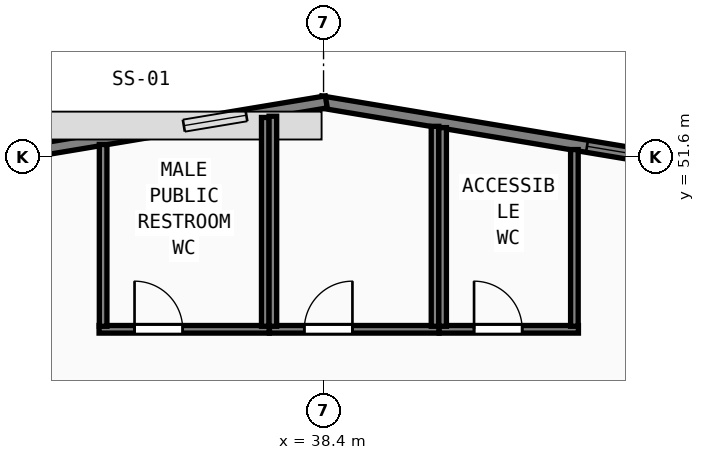
"""IFC4 building model, lengths in metres.
Left out: names, types, materials, properties, quantities, classifications, styles, units other than length and angle.
Written with IfcOpenShell. Run it as: python <this file> out.ifc"""

import sys

from ifc_helpers import new_model, si_unit, direction, frame, frame_2d, origin, origin_2d, place, context, subcontext, project, spatial, rectangle, hollow_rectangle, extrude, element, fill, save


model = new_model("IFC4")
c1 = context("Model", 3, precision=1e-05, world=origin(), true_north=direction((0.0, 1.0)))
c2 = subcontext(c1, "Body", "Model", "MODEL_VIEW")
j1 = project(units=[si_unit("LENGTHUNIT", "METRE"), si_unit("PLANEANGLEUNIT", "RADIAN")], contexts=[c1])
p1 = place(None, origin())
s1 = spatial("IfcSite", under=j1, at=p1, CompositionType="ELEMENT")
p2 = place(p1, origin())
s2 = spatial("IfcBuilding", under=s1, at=p2, CompositionType="ELEMENT")
p3 = place(p2, frame((0.0, 0.0, 164.6)))
s3 = spatial("IfcBuildingStorey", under=s2, at=p3, CompositionType="ELEMENT", Elevation=164.6)
p4 = place(p3, frame((38.4, 50.4, 0.0), z_axis=(0.0, 0.0, 1.0), x_axis=(1.0, 0.0, 0.0)))
e1 = element("IfcColumn", 1, at=p4, inside=s3, PredefinedType="COLUMN", context=c2, shape_type="SweptSolid", body=[
    extrude(hollow_rectangle(XDim=0.8, YDim=0.8, WallThickness=0.03, at=origin_2d()), origin(), (0.0, 0.0, 1.0), 4.4),
])
p5 = place(p3, frame((45.606, 51.477, 0.0), z_axis=(0.0, 0.0, 1.0), x_axis=(-0.986394820321, 0.164393608283, 0.0)))
e2 = element("IfcWall", 2, at=p5, inside=s3, PredefinedType="SOLIDWALL", context=c2, shape_type="SweptSolid", body=[
    extrude(rectangle(XDim=7.36, YDim=0.24, at=frame_2d((3.68, 0.0))), origin(), (0.0, 0.0, 1.0), 4.22),
])
p6 = place(p5, frame((0.784, 0.0, 0.85)))
e3 = element("IfcOpeningElement", 3, at=p6, cuts=e2, PredefinedType="OPENING", context=c2, shape_type="SweptSolid", body=[
    extrude(rectangle(XDim=1.25, YDim=1.95, at=frame_2d((0.625, 0.975))), frame((0.0, 0.13, 0.0), z_axis=(0.0, -1.0, 0.0), x_axis=(1.0, 0.0, 0.0)), (0.0, 0.0, 1.0), 0.26),
])
p7 = place(p3, frame((38.454, 52.687, 0.0), z_axis=(0.0, 0.0, 1.0), x_axis=(-0.986394820321, -0.164393608283, 0.0)))
e4 = element("IfcWall", 4, at=p7, inside=s3, PredefinedType="SOLIDWALL", context=c2, shape_type="SweptSolid", body=[
    extrude(rectangle(XDim=7.36, YDim=0.24, at=frame_2d((3.68, 0.0))), origin(), (0.0, 0.0, 1.0), 4.22),
])
p8 = place(p7, frame((1.6, 0.0, 0.85)))
e5 = element("IfcOpeningElement", 5, at=p8, cuts=e4, PredefinedType="OPENING", context=c2, shape_type="SweptSolid", body=[
    extrude(rectangle(XDim=1.25, YDim=1.95, at=frame_2d((0.625, 0.975))), frame((0.0, 0.13, 0.0), z_axis=(0.0, -1.0, 0.0), x_axis=(1.0, 0.0, 0.0)), (0.0, 0.0, 1.0), 0.26),
])
p9 = place(p3, frame((33.97, 48.2, 0.0), z_axis=(0.0, 0.0, 1.0), x_axis=(1.0, 0.0, 0.0)))
e6 = element("IfcWall", 6, at=p9, inside=s3, PredefinedType="PARTITIONING", context=c2, shape_type="SweptSolid", body=[
    extrude(rectangle(XDim=3.36, YDim=0.15, at=frame_2d((1.68, 0.0))), origin(), (0.0, 0.0, 1.0), 4.22),
])
p10 = place(p9, frame((0.7, 0.0, 0.0)))
e7 = element("IfcOpeningElement", 7, at=p10, cuts=e6, PredefinedType="OPENING", context=c2, shape_type="SweptSolid", body=[
    extrude(rectangle(XDim=0.95, YDim=2.12, at=frame_2d((0.475, 1.06))), frame((0.0, 0.085, 0.0), z_axis=(0.0, -1.0, 0.0), x_axis=(1.0, 0.0, 0.0)), (0.0, 0.0, 1.0), 0.17),
])
p11 = place(p3, frame((34.05, 48.26, 0.0), z_axis=(0.0, 0.0, 1.0), x_axis=(0.0, 1.0, 0.0)))
e8 = element("IfcWall", 8, at=p11, inside=s3, PredefinedType="PARTITIONING", context=c2, shape_type="SweptSolid", body=[
    extrude(rectangle(XDim=3.587, YDim=0.15, at=frame_2d((1.793, 0.0))), origin(), (0.0, 0.0, 1.0), 4.22),
])
p12 = place(p3, frame((37.25, 48.26, 0.0), z_axis=(0.0, 0.0, 1.0), x_axis=(0.0, 1.0, 0.0)))
e9 = element("IfcWall", 9, at=p12, inside=s3, PredefinedType="PARTITIONING", context=c2, shape_type="SweptSolid", body=[
    extrude(rectangle(XDim=4.12, YDim=0.15, at=frame_2d((2.06, 0.0))), origin(), (0.0, 0.0, 1.0), 4.22),
])
p13 = place(p3, frame((37.332, 48.2, 0.0), z_axis=(0.0, 0.0, 1.0), x_axis=(1.0, 0.0, 0.0)))
e10 = element("IfcWall", 10, at=p13, inside=s3, PredefinedType="PARTITIONING", context=c2, shape_type="SweptSolid", body=[
    extrude(rectangle(XDim=3.348, YDim=0.15, at=frame_2d((1.674, 0.0))), origin(), (0.0, 0.0, 1.0), 4.22),
])
p14 = place(p13, frame((0.688, 0.0, 0.0)))
e11 = element("IfcOpeningElement", 11, at=p14, cuts=e10, PredefinedType="OPENING", context=c2, shape_type="SweptSolid", body=[
    extrude(rectangle(XDim=0.95, YDim=2.12, at=frame_2d((0.475, 1.06))), frame((0.0, 0.085, 0.0), z_axis=(0.0, -1.0, 0.0), x_axis=(1.0, 0.0, 0.0)), (0.0, 0.0, 1.0), 0.17),
])
p15 = place(p3, frame((37.4, 48.26, 0.0), z_axis=(0.0, 0.0, 1.0), x_axis=(0.0, 1.0, 0.0)))
e12 = element("IfcWall", 12, at=p15, inside=s3, PredefinedType="PARTITIONING", context=c2, shape_type="SweptSolid", body=[
    extrude(rectangle(XDim=4.145, YDim=0.15, at=frame_2d((2.073, 0.0))), origin(), (0.0, 0.0, 1.0), 4.22),
])
p16 = place(p3, frame((40.6, 48.26, 0.0), z_axis=(0.0, 0.0, 1.0), x_axis=(0.0, 1.0, 0.0)))
e13 = element("IfcWall", 13, at=p16, inside=s3, PredefinedType="PARTITIONING", context=c2, shape_type="SweptSolid", body=[
    extrude(rectangle(XDim=3.945, YDim=0.15, at=frame_2d((1.973, 0.0))), origin(), (0.0, 0.0, 1.0), 4.22),
])
p17 = place(p3, frame((40.682, 48.2, 0.0), z_axis=(0.0, 0.0, 1.0), x_axis=(1.0, 0.0, 0.0)))
e14 = element("IfcWall", 14, at=p17, inside=s3, PredefinedType="PARTITIONING", context=c2, shape_type="SweptSolid", body=[
    extrude(rectangle(XDim=2.748, YDim=0.15, at=frame_2d((1.374, 0.0))), origin(), (0.0, 0.0, 1.0), 4.22),
])
p18 = place(p17, frame((0.688, 0.0, 0.0)))
e15 = element("IfcOpeningElement", 15, at=p18, cuts=e14, PredefinedType="OPENING", context=c2, shape_type="SweptSolid", body=[
    extrude(rectangle(XDim=0.95, YDim=2.12, at=frame_2d((0.475, 1.06))), frame((0.0, 0.085, 0.0), z_axis=(0.0, -1.0, 0.0), x_axis=(1.0, 0.0, 0.0)), (0.0, 0.0, 1.0), 0.17),
])
p19 = place(p3, frame((40.75, 48.26, 0.0), z_axis=(0.0, 0.0, 1.0), x_axis=(0.0, 1.0, 0.0)))
e16 = element("IfcWall", 16, at=p19, inside=s3, PredefinedType="PARTITIONING", context=c2, shape_type="SweptSolid", body=[
    extrude(rectangle(XDim=3.92, YDim=0.15, at=frame_2d((1.96, 0.0))), origin(), (0.0, 0.0, 1.0), 4.22),
])
p20 = place(p3, frame((43.35, 48.26, 0.0), z_axis=(0.0, 0.0, 1.0), x_axis=(0.0, 1.0, 0.0)))
e17 = element("IfcWall", 17, at=p20, inside=s3, PredefinedType="PARTITIONING", context=c2, shape_type="SweptSolid", body=[
    extrude(rectangle(XDim=3.487, YDim=0.15, at=frame_2d((1.743, 0.0))), origin(), (0.0, 0.0, 1.0), 4.22),
])
p21 = place(p6, origin())
e18 = element("IfcWindow", 18, at=p21, inside=s3, PartitioningType="SINGLE_PANEL", PredefinedType="WINDOW", context=c2, shape_type="SweptSolid", body=[
    extrude(rectangle(XDim=1.25, YDim=1.95, at=frame_2d((0.625, 0.975))), frame((0.0, 0.03, 0.0), z_axis=(0.0, -1.0, 0.0), x_axis=(1.0, 0.0, 0.0)), (0.0, 0.0, 1.0), 0.06),
])
fill(e3, e18)
p22 = place(p8, origin())
e19 = element("IfcWindow", 19, at=p22, inside=s3, PartitioningType="SINGLE_PANEL", PredefinedType="WINDOW", context=c2, shape_type="SweptSolid", body=[
    extrude(rectangle(XDim=1.25, YDim=1.95, at=frame_2d((0.625, 0.975))), frame((0.0, 0.03, 0.0), z_axis=(0.0, -1.0, 0.0), x_axis=(1.0, 0.0, 0.0)), (0.0, 0.0, 1.0), 0.06),
])
fill(e5, e19)
p23 = place(p10, origin())
e20 = element("IfcDoor", 20, at=p23, inside=s3, OperationType="SINGLE_SWING_LEFT", PredefinedType="DOOR", context=c2, shape_type="SweptSolid", body=[
    extrude(rectangle(XDim=0.95, YDim=2.12, at=frame_2d((0.475, 1.06))), frame((0.0, 0.025, 0.0), z_axis=(0.0, -1.0, 0.0), x_axis=(1.0, 0.0, 0.0)), (0.0, 0.0, 1.0), 0.05),
])
fill(e7, e20)
p24 = place(p14, origin())
e21 = element("IfcDoor", 21, at=p24, inside=s3, OperationType="SINGLE_SWING_RIGHT", PredefinedType="DOOR", context=c2, shape_type="SweptSolid", body=[
    extrude(rectangle(XDim=0.95, YDim=2.12, at=frame_2d((0.475, 1.06))), frame((0.0, 0.025, 0.0), z_axis=(0.0, -1.0, 0.0), x_axis=(1.0, 0.0, 0.0)), (0.0, 0.0, 1.0), 0.05),
])
fill(e11, e21)
p25 = place(p18, origin())
e22 = element("IfcDoor", 22, at=p25, inside=s3, OperationType="SINGLE_SWING_LEFT", PredefinedType="DOOR", context=c2, shape_type="SweptSolid", body=[
    extrude(rectangle(XDim=0.95, YDim=2.12, at=frame_2d((0.475, 1.06))), frame((0.0, 0.025, 0.0), z_axis=(0.0, -1.0, 0.0), x_axis=(1.0, 0.0, 0.0)), (0.0, 0.0, 1.0), 0.05),
])
fill(e15, e22)
save(model, sys.argv[1])
